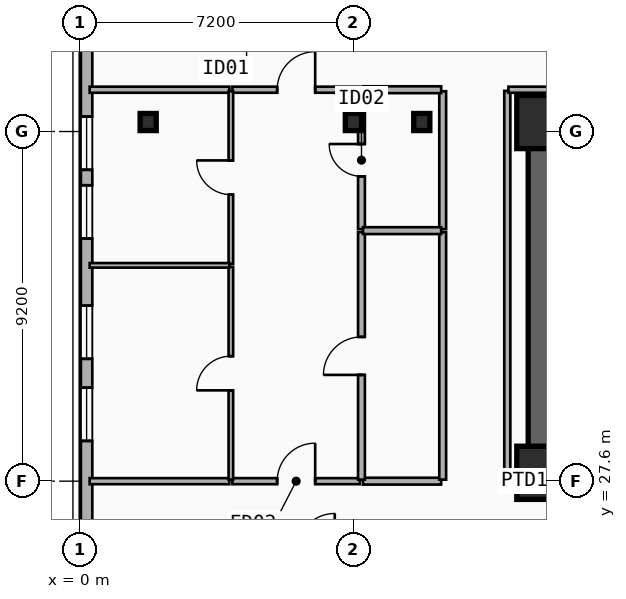
"""IFC4 building model, lengths in metres.
Left out: names, types, materials, properties, quantities, classifications, styles, units other than length and angle.
Written with IfcOpenShell. Run it as: python <this file> out.ifc"""

import sys

from ifc_helpers import new_model, si_unit, direction, frame, frame_2d, origin, origin_2d, place, context, subcontext, project, spatial, rectangle, i_section, extrude, element, fill, save


model = new_model("IFC4")
c1 = context("Model", 3, precision=1e-05, world=origin(), true_north=direction((0.0, 1.0)))
c2 = subcontext(c1, "Body", "Model", "MODEL_VIEW")
j1 = project(units=[si_unit("LENGTHUNIT", "METRE"), si_unit("PLANEANGLEUNIT", "RADIAN")], contexts=[c1])
p1 = place(None, origin())
s1 = spatial("IfcSite", under=j1, at=p1, CompositionType="ELEMENT")
p2 = place(p1, origin())
s2 = spatial("IfcBuilding", under=s1, at=p2, CompositionType="ELEMENT")
p3 = place(p2, frame((0.0, 0.0, 64.0)))
s3 = spatial("IfcBuildingStorey", under=s2, at=p3, CompositionType="ELEMENT", Elevation=64.0)
p4 = place(p3, frame((12.15, 37.05, 0.0), z_axis=(0.0, 0.0, 1.0), x_axis=(1.0, 0.0, 0.0)))
e1 = element("IfcWall", 1, at=p4, inside=s3, PredefinedType="SHEAR", context=c2, shape_type="SweptSolid", body=[
    extrude(rectangle(XDim=33.23, YDim=0.7, at=frame_2d((16.615, 0.0))), origin(), (0.0, 0.0, 1.0), 3.5),
])
p5 = place(p3, frame((21.18, 27.82, 0.0), z_axis=(0.0, 0.0, 1.0), x_axis=(-1.0, 0.0, 0.0)))
e2 = element("IfcWall", 2, at=p5, inside=s3, PredefinedType="SHEAR", context=c2, shape_type="SweptSolid", body=[
    extrude(rectangle(XDim=9.03, YDim=0.7, at=frame_2d((4.515, 0.0))), origin(), (0.0, 0.0, 1.0), 3.5),
])
p6 = place(p5, frame((2.68, 0.0, 0.0)))
e3 = element("IfcOpeningElement", 3, at=p6, cuts=e2, PredefinedType="OPENING", context=c2, shape_type="SweptSolid", body=[
    extrude(rectangle(XDim=1.1, YDim=2.15, at=frame_2d((0.55, 1.075))), frame((0.0, 0.36, 0.0), z_axis=(0.0, -1.0, 0.0), x_axis=(1.0, 0.0, 0.0)), (0.0, 0.0, 1.0), 0.72),
])
p7 = place(p3, frame((12.15, 28.17, 0.0), z_axis=(0.0, 0.0, 1.0), x_axis=(0.0, 1.0, 0.0)))
e4 = element("IfcWall", 4, at=p7, inside=s3, PredefinedType="SHEAR", context=c2, shape_type="SweptSolid", body=[
    extrude(rectangle(XDim=8.53, YDim=0.7, at=frame_2d((4.265, 0.0))), origin(), (0.0, 0.0, 1.0), 3.5),
])
for number, where, z_axis, x_axis in (
    (5, (12.2, 27.82, 0.0), (0.0, 0.0, 1.0), (1.0, 0.0, 0.0)),
    (6, (12.2, 37.05, 0.0), (0.0, 0.0, 1.0), (1.0, 0.0, 0.0)),
):
    element("IfcColumn", number, at=place(p3, frame(where, z_axis=z_axis, x_axis=x_axis)), inside=s3, PredefinedType="COLUMN", context=c2, shape_type="SweptSolid", body=[
        extrude(rectangle(XDim=1.4, YDim=1.4, at=origin_2d()), origin(), (0.0, 0.0, 1.0), 3.5),
    ])
for number, where, z_axis, x_axis in (
    (7, (9.0, 37.05, 0.0), (0.0, 0.0, 1.0), (1.0, 0.0, 0.0)),
    (8, (1.8, 37.05, 0.0), (0.0, 0.0, 1.0), (1.0, 0.0, 0.0)),
    (9, (7.2, 37.05, 0.0), (0.0, 0.0, 1.0), (1.0, 0.0, 0.0)),
):
    element("IfcColumn", number, at=place(p3, frame(where, z_axis=z_axis, x_axis=x_axis)), inside=s3, PredefinedType="COLUMN", context=c2, shape_type="SweptSolid", body=[
        extrude(i_section(OverallWidth=0.424, OverallDepth=0.45, WebThickness=0.041, FlangeThickness=0.065, FilletRadius=0.015, at=origin_2d()), origin(), (0.0, 0.0, 1.0), 3.5),
    ])
p8 = place(p3, frame((0.18, 25.8, 0.0), z_axis=(0.0, 0.0, 1.0), x_axis=(0.0, 1.0, 0.0)))
e10 = element("IfcWall", 10, at=p8, inside=s3, PredefinedType="SOLIDWALL", context=c2, shape_type="SweptSolid", body=[
    extrude(rectangle(XDim=15.2, YDim=0.3, at=frame_2d((7.6, 0.0))), origin(), (0.0, 0.0, 1.0), 3.24),
])
p9 = place(p8, frame((2.86, 0.0, 0.48)))
e11 = element("IfcOpeningElement", 11, at=p9, cuts=e10, PredefinedType="OPENING", context=c2, shape_type="SweptSolid", body=[
    extrude(rectangle(XDim=1.4, YDim=1.8, at=frame_2d((0.7, 0.9))), frame((0.0, 0.16, 0.0), z_axis=(0.0, -1.0, 0.0), x_axis=(1.0, 0.0, 0.0)), (0.0, 0.0, 1.0), 0.32),
])
p10 = place(p8, frame((5.019, 0.0, 0.48)))
e12 = element("IfcOpeningElement", 12, at=p10, cuts=e10, PredefinedType="OPENING", context=c2, shape_type="SweptSolid", body=[
    extrude(rectangle(XDim=1.4, YDim=1.8, at=frame_2d((0.7, 0.9))), frame((0.0, 0.16, 0.0), z_axis=(0.0, -1.0, 0.0), x_axis=(1.0, 0.0, 0.0)), (0.0, 0.0, 1.0), 0.32),
])
p11 = place(p8, frame((8.186, 0.0, 0.48)))
e13 = element("IfcOpeningElement", 13, at=p11, cuts=e10, PredefinedType="OPENING", context=c2, shape_type="SweptSolid", body=[
    extrude(rectangle(XDim=1.4, YDim=1.8, at=frame_2d((0.7, 0.9))), frame((0.0, 0.16, 0.0), z_axis=(0.0, -1.0, 0.0), x_axis=(1.0, 0.0, 0.0)), (0.0, 0.0, 1.0), 0.32),
])
p12 = place(p8, frame((9.993, 0.0, 0.48)))
e14 = element("IfcOpeningElement", 14, at=p12, cuts=e10, PredefinedType="OPENING", context=c2, shape_type="SweptSolid", body=[
    extrude(rectangle(XDim=1.4, YDim=1.8, at=frame_2d((0.7, 0.9))), frame((0.0, 0.16, 0.0), z_axis=(0.0, -1.0, 0.0), x_axis=(1.0, 0.0, 0.0)), (0.0, 0.0, 1.0), 0.32),
])
p13 = place(p3, frame((4.016, 27.6, 0.0), z_axis=(0.0, 0.0, 1.0), x_axis=(1.0, 0.0, 0.0)))
e15 = element("IfcWall", 15, at=p13, inside=s3, PredefinedType="PARTITIONING", context=c2, shape_type="SweptSolid", body=[
    extrude(rectangle(XDim=3.357, YDim=0.16, at=frame_2d((1.678, 0.0))), origin(), (0.0, 0.0, 1.0), 2.57),
])
p14 = place(p13, frame((1.178, 0.0, 0.0)))
e16 = element("IfcOpeningElement", 16, at=p14, cuts=e15, PredefinedType="OPENING", context=c2, shape_type="SweptSolid", body=[
    extrude(rectangle(XDim=1.0, YDim=2.15, at=frame_2d((0.5, 1.075))), frame((0.0, 0.09, 0.0), z_axis=(0.0, -1.0, 0.0), x_axis=(1.0, 0.0, 0.0)), (0.0, 0.0, 1.0), 0.18),
])
p15 = place(p3, frame((7.453, 27.6, 0.0), z_axis=(0.0, 0.0, 1.0), x_axis=(1.0, 0.0, 0.0)))
e17 = element("IfcWall", 17, at=p15, inside=s3, PredefinedType="PLUMBINGWALL", context=c2, shape_type="SweptSolid", body=[
    extrude(rectangle(XDim=2.057, YDim=0.18, at=frame_2d((1.029, 0.0))), origin(), (0.0, 0.0, 1.0), 2.57),
])
p16 = place(p3, frame((0.26, 27.6, 0.0), z_axis=(0.0, 0.0, 1.0), x_axis=(1.0, 0.0, 0.0)))
e18 = element("IfcWall", 18, at=p16, inside=s3, PredefinedType="PARTITIONING", context=c2, shape_type="SweptSolid", body=[
    extrude(rectangle(XDim=3.676, YDim=0.16, at=frame_2d((1.838, 0.0))), origin(), (0.0, 0.0, 1.0), 2.57),
])
p17 = place(p3, frame((9.55, 27.64, 0.0), z_axis=(0.0, 0.0, 1.0), x_axis=(0.0, 1.0, 0.0)))
e19 = element("IfcWall", 19, at=p17, inside=s3, PredefinedType="PLUMBINGWALL", context=c2, shape_type="SweptSolid", body=[
    extrude(rectangle(XDim=6.512, YDim=0.18, at=frame_2d((3.256, 0.0))), origin(), (0.0, 0.0, 1.0), 3.24),
])
p18 = place(p3, frame((9.55, 34.232, 0.0), z_axis=(0.0, 0.0, 1.0), x_axis=(0.0, 1.0, 0.0)))
e20 = element("IfcWall", 20, at=p18, inside=s3, PredefinedType="PLUMBINGWALL", context=c2, shape_type="SweptSolid", body=[
    extrude(rectangle(XDim=3.628, YDim=0.18, at=frame_2d((1.814, 0.0))), origin(), (0.0, 0.0, 1.0), 2.72),
])
p19 = place(p3, frame((4.016, 37.9, 0.0), z_axis=(0.0, 0.0, 1.0), x_axis=(1.0, 0.0, 0.0)))
e21 = element("IfcWall", 21, at=p19, inside=s3, PredefinedType="PARTITIONING", context=c2, shape_type="SweptSolid", body=[
    extrude(rectangle(XDim=3.357, YDim=0.16, at=frame_2d((1.678, 0.0))), origin(), (0.0, 0.0, 1.0), 3.24),
])
p20 = place(p19, frame((1.178, 0.0, 0.0)))
e22 = element("IfcOpeningElement", 22, at=p20, cuts=e21, PredefinedType="OPENING", context=c2, shape_type="SweptSolid", body=[
    extrude(rectangle(XDim=1.0, YDim=2.15, at=frame_2d((0.5, 1.075))), frame((0.0, 0.09, 0.0), z_axis=(0.0, -1.0, 0.0), x_axis=(1.0, 0.0, 0.0)), (0.0, 0.0, 1.0), 0.18),
])
p21 = place(p3, frame((7.453, 37.9, 0.0), z_axis=(0.0, 0.0, 1.0), x_axis=(1.0, 0.0, 0.0)))
e23 = element("IfcWall", 23, at=p21, inside=s3, PredefinedType="PLUMBINGWALL", context=c2, shape_type="SweptSolid", body=[
    extrude(rectangle(XDim=2.057, YDim=0.18, at=frame_2d((1.029, 0.0))), origin(), (0.0, 0.0, 1.0), 3.24),
])
p22 = place(p3, frame((0.26, 37.9, 0.0), z_axis=(0.0, 0.0, 1.0), x_axis=(1.0, 0.0, 0.0)))
e24 = element("IfcWall", 24, at=p22, inside=s3, PredefinedType="PARTITIONING", context=c2, shape_type="SweptSolid", body=[
    extrude(rectangle(XDim=3.676, YDim=0.16, at=frame_2d((1.838, 0.0))), origin(), (0.0, 0.0, 1.0), 3.24),
])
p23 = place(p3, frame((7.413, 27.64, 0.0), z_axis=(0.0, 0.0, 1.0), x_axis=(0.0, 1.0, 0.0)))
e25 = element("IfcWall", 25, at=p23, inside=s3, PredefinedType="PLUMBINGWALL", context=c2, shape_type="SweptSolid", body=[
    extrude(rectangle(XDim=6.512, YDim=0.18, at=frame_2d((3.256, 0.0))), origin(), (0.0, 0.0, 1.0), 2.57),
])
p24 = place(p23, frame((2.756, 0.0, 0.0)))
e26 = element("IfcOpeningElement", 26, at=p24, cuts=e25, PredefinedType="OPENING", context=c2, shape_type="SweptSolid", body=[
    extrude(rectangle(XDim=1.0, YDim=2.15, at=frame_2d((0.5, 1.075))), frame((0.0, 0.1, 0.0), z_axis=(0.0, -1.0, 0.0), x_axis=(1.0, 0.0, 0.0)), (0.0, 0.0, 1.0), 0.2),
])
p25 = place(p3, frame((7.413, 34.232, 0.0), z_axis=(0.0, 0.0, 1.0), x_axis=(0.0, 1.0, 0.0)))
e27 = element("IfcWall", 27, at=p25, inside=s3, PredefinedType="PLUMBINGWALL", context=c2, shape_type="SweptSolid", body=[
    extrude(rectangle(XDim=3.628, YDim=0.18, at=frame_2d((1.814, 0.0))), origin(), (0.0, 0.0, 1.0), 2.57),
])
p26 = place(p25, frame((1.389, 0.0, 0.0)))
e28 = element("IfcOpeningElement", 28, at=p26, cuts=e27, PredefinedType="OPENING", context=c2, shape_type="SweptSolid", body=[
    extrude(rectangle(XDim=0.85, YDim=2.1, at=frame_2d((0.425, 1.05))), frame((0.0, 0.1, 0.0), z_axis=(0.0, -1.0, 0.0), x_axis=(1.0, 0.0, 0.0)), (0.0, 0.0, 1.0), 0.2),
])
p27 = place(p3, frame((3.976, 27.64, 0.0), z_axis=(0.0, 0.0, 1.0), x_axis=(0.0, 1.0, 0.0)))
e29 = element("IfcWall", 29, at=p27, inside=s3, PredefinedType="PARTITIONING", context=c2, shape_type="SweptSolid", body=[
    extrude(rectangle(XDim=5.599, YDim=0.12, at=frame_2d((2.8, 0.0))), origin(), (0.0, 0.0, 1.0), 3.24),
])
p28 = place(p27, frame((2.35, 0.0, 0.0)))
e30 = element("IfcOpeningElement", 30, at=p28, cuts=e29, PredefinedType="OPENING", context=c2, shape_type="SweptSolid", body=[
    extrude(rectangle(XDim=0.9, YDim=2.1, at=frame_2d((0.45, 1.05))), frame((0.0, 0.07, 0.0), z_axis=(0.0, -1.0, 0.0), x_axis=(1.0, 0.0, 0.0)), (0.0, 0.0, 1.0), 0.14),
])
p29 = place(p3, frame((3.976, 33.319, 0.0), z_axis=(0.0, 0.0, 1.0), x_axis=(0.0, 1.0, 0.0)))
e31 = element("IfcWall", 31, at=p29, inside=s3, PredefinedType="PARTITIONING", context=c2, shape_type="SweptSolid", body=[
    extrude(rectangle(XDim=4.541, YDim=0.12, at=frame_2d((2.271, 0.0))), origin(), (0.0, 0.0, 1.0), 2.72),
])
p30 = place(p29, frame((1.821, 0.0, 0.0)))
e32 = element("IfcOpeningElement", 32, at=p30, cuts=e31, PredefinedType="OPENING", context=c2, shape_type="SweptSolid", body=[
    extrude(rectangle(XDim=0.9, YDim=2.1, at=frame_2d((0.45, 1.05))), frame((0.0, 0.07, 0.0), z_axis=(0.0, -1.0, 0.0), x_axis=(1.0, 0.0, 0.0)), (0.0, 0.0, 1.0), 0.14),
])
p31 = place(p3, frame((7.453, 34.192, 0.0), z_axis=(0.0, 0.0, 1.0), x_axis=(1.0, 0.0, 0.0)))
e33 = element("IfcWall", 33, at=p31, inside=s3, PredefinedType="PLUMBINGWALL", context=c2, shape_type="SweptSolid", body=[
    extrude(rectangle(XDim=2.057, YDim=0.18, at=frame_2d((1.029, 0.0))), origin(), (0.0, 0.0, 1.0), 2.57),
])
p32 = place(p3, frame((0.26, 33.279, 0.0), z_axis=(0.0, 0.0, 1.0), x_axis=(1.0, 0.0, 0.0)))
e34 = element("IfcWall", 34, at=p32, inside=s3, PredefinedType="PARTITIONING", context=c2, shape_type="SweptSolid", body=[
    extrude(rectangle(XDim=3.676, YDim=0.12, at=frame_2d((1.838, 0.0))), origin(), (0.0, 0.0, 1.0), 2.57),
])
p33 = place(p3, frame((11.28, 27.6, 0.0), z_axis=(0.0, 0.0, 1.0), x_axis=(1.0, 0.0, 0.0)))
e35 = element("IfcWall", 35, at=p33, inside=s3, PredefinedType="PARTITIONING", context=c2, shape_type="SweptSolid", body=[
    extrude(rectangle(XDim=0.84, YDim=0.16, at=frame_2d((0.42, 0.0))), origin(), (0.0, 0.0, 1.0), 2.28),
])
p34 = place(p3, frame((11.25, 27.63, 0.0), z_axis=(0.0, 0.0, 1.0), x_axis=(0.0, 1.0, 0.0)))
e36 = element("IfcWall", 36, at=p34, inside=s3, PredefinedType="PARTITIONING", context=c2, shape_type="SweptSolid", body=[
    extrude(rectangle(XDim=10.24, YDim=0.16, at=frame_2d((5.12, 0.0))), origin(), (0.0, 0.0, 1.0), 2.72),
])
p35 = place(p3, frame((11.28, 37.9, 0.0), z_axis=(0.0, 0.0, 1.0), x_axis=(1.0, 0.0, 0.0)))
e37 = element("IfcWall", 37, at=p35, inside=s3, PredefinedType="PARTITIONING", context=c2, shape_type="SweptSolid", body=[
    extrude(rectangle(XDim=35.04, YDim=0.16, at=frame_2d((17.52, 0.0))), origin(), (0.0, 0.0, 1.0), 3.24),
])
p36 = place(p9, origin())
e38 = element("IfcWindow", 38, at=p36, inside=s3, PartitioningType="SINGLE_PANEL", PredefinedType="WINDOW", context=c2, shape_type="SweptSolid", body=[
    extrude(rectangle(XDim=1.4, YDim=1.8, at=frame_2d((0.7, 0.9))), frame((0.0, 0.03, 0.0), z_axis=(0.0, -1.0, 0.0), x_axis=(1.0, 0.0, 0.0)), (0.0, 0.0, 1.0), 0.06),
])
fill(e11, e38)
p37 = place(p10, origin())
e39 = element("IfcWindow", 39, at=p37, inside=s3, PartitioningType="SINGLE_PANEL", PredefinedType="WINDOW", context=c2, shape_type="SweptSolid", body=[
    extrude(rectangle(XDim=1.4, YDim=1.8, at=frame_2d((0.7, 0.9))), frame((0.0, 0.03, 0.0), z_axis=(0.0, -1.0, 0.0), x_axis=(1.0, 0.0, 0.0)), (0.0, 0.0, 1.0), 0.06),
])
fill(e12, e39)
p38 = place(p11, origin())
e40 = element("IfcWindow", 40, at=p38, inside=s3, PartitioningType="SINGLE_PANEL", PredefinedType="WINDOW", context=c2, shape_type="SweptSolid", body=[
    extrude(rectangle(XDim=1.4, YDim=1.8, at=frame_2d((0.7, 0.9))), frame((0.0, 0.03, 0.0), z_axis=(0.0, -1.0, 0.0), x_axis=(1.0, 0.0, 0.0)), (0.0, 0.0, 1.0), 0.06),
])
fill(e13, e40)
p39 = place(p12, origin())
e41 = element("IfcWindow", 41, at=p39, inside=s3, PartitioningType="SINGLE_PANEL", PredefinedType="WINDOW", context=c2, shape_type="SweptSolid", body=[
    extrude(rectangle(XDim=1.4, YDim=1.8, at=frame_2d((0.7, 0.9))), frame((0.0, 0.03, 0.0), z_axis=(0.0, -1.0, 0.0), x_axis=(1.0, 0.0, 0.0)), (0.0, 0.0, 1.0), 0.06),
])
fill(e14, e41)
p40 = place(p14, origin())
e42 = element("IfcDoor", 42, at=p40, inside=s3, OperationType="SINGLE_SWING_RIGHT", PredefinedType="DOOR", context=c2, shape_type="SweptSolid", body=[
    extrude(rectangle(XDim=1.0, YDim=2.15, at=frame_2d((0.5, 1.075))), frame((0.0, 0.025, 0.0), z_axis=(0.0, -1.0, 0.0), x_axis=(1.0, 0.0, 0.0)), (0.0, 0.0, 1.0), 0.05),
])
fill(e16, e42)
p41 = place(p20, origin())
e43 = element("IfcDoor", 43, at=p41, inside=s3, OperationType="SINGLE_SWING_RIGHT", PredefinedType="DOOR", context=c2, shape_type="SweptSolid", body=[
    extrude(rectangle(XDim=1.0, YDim=2.15, at=frame_2d((0.5, 1.075))), frame((0.0, 0.025, 0.0), z_axis=(0.0, -1.0, 0.0), x_axis=(1.0, 0.0, 0.0)), (0.0, 0.0, 1.0), 0.05),
])
fill(e22, e43)
p42 = place(p24, origin())
e44 = element("IfcDoor", 44, at=p42, inside=s3, OperationType="SINGLE_SWING_LEFT", PredefinedType="DOOR", context=c2, shape_type="SweptSolid", body=[
    extrude(rectangle(XDim=1.0, YDim=2.15, at=frame_2d((0.5, 1.075))), frame((0.0, 0.025, 0.0), z_axis=(0.0, -1.0, 0.0), x_axis=(1.0, 0.0, 0.0)), (0.0, 0.0, 1.0), 0.05),
])
fill(e26, e44)
p43 = place(p26, origin())
e45 = element("IfcDoor", 45, at=p43, inside=s3, OperationType="SINGLE_SWING_RIGHT", PredefinedType="DOOR", context=c2, shape_type="SweptSolid", body=[
    extrude(rectangle(XDim=0.85, YDim=2.1, at=frame_2d((0.425, 1.05))), frame((0.0, 0.025, 0.0), z_axis=(0.0, -1.0, 0.0), x_axis=(1.0, 0.0, 0.0)), (0.0, 0.0, 1.0), 0.05),
])
fill(e28, e45)
p44 = place(p28, origin())
e46 = element("IfcDoor", 46, at=p44, inside=s3, OperationType="SINGLE_SWING_LEFT", PredefinedType="DOOR", context=c2, shape_type="SweptSolid", body=[
    extrude(rectangle(XDim=0.9, YDim=2.1, at=frame_2d((0.45, 1.05))), frame((0.0, 0.025, 0.0), z_axis=(0.0, -1.0, 0.0), x_axis=(1.0, 0.0, 0.0)), (0.0, 0.0, 1.0), 0.05),
])
fill(e30, e46)
p45 = place(p30, origin())
e47 = element("IfcDoor", 47, at=p45, inside=s3, OperationType="SINGLE_SWING_RIGHT", PredefinedType="DOOR", context=c2, shape_type="SweptSolid", body=[
    extrude(rectangle(XDim=0.9, YDim=2.1, at=frame_2d((0.45, 1.05))), frame((0.0, 0.025, 0.0), z_axis=(0.0, -1.0, 0.0), x_axis=(1.0, 0.0, 0.0)), (0.0, 0.0, 1.0), 0.05),
])
fill(e32, e47)
save(model, sys.argv[1])
